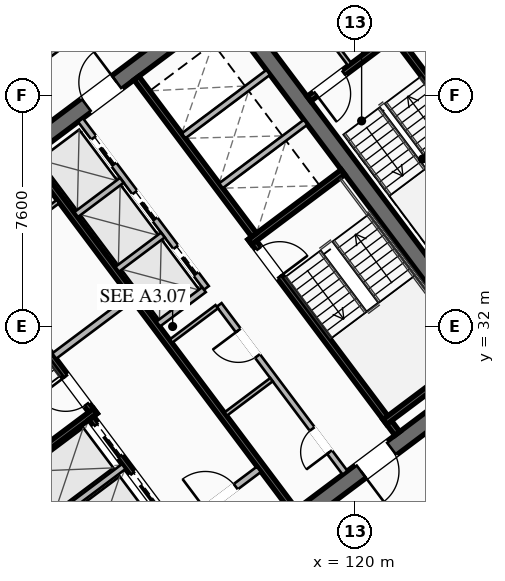
"""IFC4 building model, lengths in metres.
Left out: names, types, materials, properties, quantities, classifications, styles, units other than length and angle.
Written with IfcOpenShell. Run it as: python <this file> out.ifc"""

import sys

from ifc_helpers import new_model, si_unit, direction, frame, frame_2d, origin, place, context, subcontext, project, spatial, rectangle, extrude, element, fill, save


model = new_model("IFC4")
c1 = context("Model", 3, precision=1e-05, world=origin(), true_north=direction((0.0, 1.0)))
c2 = subcontext(c1, "Body", "Model", "MODEL_VIEW")
j1 = project(units=[si_unit("LENGTHUNIT", "METRE"), si_unit("PLANEANGLEUNIT", "RADIAN")], contexts=[c1])
p1 = place(None, origin())
s1 = spatial("IfcSite", under=j1, at=p1, CompositionType="ELEMENT")
p2 = place(p1, origin())
s2 = spatial("IfcBuilding", under=s1, at=p2, CompositionType="ELEMENT")
p3 = place(p2, frame((0.0, 0.0, 149.9)))
s3 = spatial("IfcBuildingStorey", under=s2, at=p3, CompositionType="ELEMENT", Elevation=149.9)
for number, where, z_axis, x_axis in (
    (1, (112.436, 21.077, 0.0), (0.0, 0.0, 1.0), (-0.6, 0.8, 0.0)),
    (2, (115.564, 42.923, 0.0), (0.0, 0.0, 1.0), (0.6, -0.8, 0.0)),
):
    element("IfcWall", number, at=place(p3, frame(where, z_axis=z_axis, x_axis=x_axis)), inside=s3, PredefinedType="SHEAR", context=c2, shape_type="SweptSolid", body=[
        extrude(rectangle(XDim=15.6, YDim=0.55, at=frame_2d((7.8, 0.0))), origin(), (0.0, 0.0, 1.0), 3.55),
    ])
p4 = place(p3, frame((124.539, 30.498, 0.0), z_axis=(0.0, 0.0, 1.0), x_axis=(-0.799998054672, -0.600002593761, 0.0)))
e3 = element("IfcWall", 3, at=p4, inside=s3, PredefinedType="SHEAR", context=c2, shape_type="SweptSolid", body=[
    extrude(rectangle(XDim=15.06, YDim=0.55, at=frame_2d((7.53, 0.0))), origin(), (0.0, 0.0, 1.0), 3.55),
])
p5 = place(p4, frame((9.23, 0.0, 0.0)))
e4 = element("IfcOpeningElement", 4, at=p5, cuts=e3, PredefinedType="OPENING", context=c2, shape_type="SweptSolid", body=[
    extrude(rectangle(XDim=1.25, YDim=2.25, at=frame_2d((0.625, 1.125))), frame((0.0, 0.285, 0.0), z_axis=(0.0, -1.0, 0.0), x_axis=(1.0, 0.0, 0.0)), (0.0, 0.0, 1.0), 0.57),
])
p6 = place(p4, frame((4.18, 0.0, 0.0)))
e5 = element("IfcOpeningElement", 5, at=p6, cuts=e3, PredefinedType="OPENING", context=c2, shape_type="SweptSolid", body=[
    extrude(rectangle(XDim=1.25, YDim=2.25, at=frame_2d((0.625, 1.125))), frame((0.0, 0.285, 0.0), z_axis=(0.0, -1.0, 0.0), x_axis=(1.0, 0.0, 0.0)), (0.0, 0.0, 1.0), 0.57),
])
p7 = place(p3, frame((103.461, 33.502, 0.0), z_axis=(0.0, 0.0, 1.0), x_axis=(0.799998054672, 0.600002593761, 0.0)))
e6 = element("IfcWall", 6, at=p7, inside=s3, PredefinedType="SHEAR", context=c2, shape_type="SweptSolid", body=[
    extrude(rectangle(XDim=15.06, YDim=0.55, at=frame_2d((7.53, 0.0))), origin(), (0.0, 0.0, 1.0), 3.55),
])
p8 = place(p7, frame((4.58, 0.0, 0.0)))
e7 = element("IfcOpeningElement", 7, at=p8, cuts=e6, PredefinedType="OPENING", context=c2, shape_type="SweptSolid", body=[
    extrude(rectangle(XDim=1.25, YDim=2.25, at=frame_2d((0.625, 1.125))), frame((0.0, 0.285, 0.0), z_axis=(0.0, -1.0, 0.0), x_axis=(1.0, 0.0, 0.0)), (0.0, 0.0, 1.0), 0.57),
])
p9 = place(p7, frame((9.63, 0.0, 0.0)))
e8 = element("IfcOpeningElement", 8, at=p9, cuts=e6, PredefinedType="OPENING", context=c2, shape_type="SweptSolid", body=[
    extrude(rectangle(XDim=1.25, YDim=2.25, at=frame_2d((0.625, 1.125))), frame((0.0, 0.285, 0.0), z_axis=(0.0, -1.0, 0.0), x_axis=(1.0, 0.0, 0.0)), (0.0, 0.0, 1.0), 0.57),
])
p10 = place(p3, frame((111.44, 29.08, 0.0), z_axis=(0.0, 0.0, 1.0), x_axis=(-0.59999029481, 0.8000072788, 0.0)))
e9 = element("IfcWall", 9, at=p10, inside=s3, PredefinedType="SHEAR", context=c2, shape_type="SweptSolid", body=[
    extrude(rectangle(XDim=8.05, YDim=0.2, at=frame_2d((4.025, 0.0))), origin(), (0.0, 0.0, 1.0), 3.37),
])
p11 = place(p10, frame((0.45, 0.0, 0.0)))
e10 = element("IfcOpeningElement", 10, at=p11, cuts=e9, PredefinedType="OPENING", context=c2, shape_type="SweptSolid", body=[
    extrude(rectangle(XDim=1.15, YDim=2.2, at=frame_2d((0.575, 1.1))), frame((0.0, 0.11, 0.0), z_axis=(0.0, -1.0, 0.0), x_axis=(1.0, 0.0, 0.0)), (0.0, 0.0, 1.0), 0.22),
])
p12 = place(p3, frame((108.396, 26.922, 0.0), z_axis=(0.0, 0.0, 1.0), x_axis=(0.800015298837, 0.599979601008, 0.0)))
e11 = element("IfcWall", 11, at=p12, inside=s3, PredefinedType="SHEAR", context=c2, shape_type="SweptSolid", body=[
    extrude(rectangle(XDim=3.83, YDim=0.2, at=frame_2d((1.915, 0.0))), origin(), (0.0, 0.0, 1.0), 3.37),
])
p13 = place(p3, frame((116.56, 34.92, 0.0), z_axis=(0.0, 0.0, 1.0), x_axis=(0.59999029481, -0.8000072788, 0.0)))
e12 = element("IfcWall", 12, at=p13, inside=s3, PredefinedType="SHEAR", context=c2, shape_type="SweptSolid", body=[
    extrude(rectangle(XDim=8.05, YDim=0.2, at=frame_2d((4.025, 0.0))), origin(), (0.0, 0.0, 1.0), 3.37),
])
p14 = place(p13, frame((0.45, 0.0, 0.0)))
e13 = element("IfcOpeningElement", 13, at=p14, cuts=e12, PredefinedType="OPENING", context=c2, shape_type="SweptSolid", body=[
    extrude(rectangle(XDim=1.15, YDim=2.2, at=frame_2d((0.575, 1.1))), frame((0.0, 0.11, 0.0), z_axis=(0.0, -1.0, 0.0), x_axis=(1.0, 0.0, 0.0)), (0.0, 0.0, 1.0), 0.22),
])
for number, where, z_axis, x_axis in (
    (14, (116.54, 34.78, 0.0), (0.0, 0.0, 1.0), (0.8, 0.6, 0.0)),
    (15, (120.98, 28.86, 0.0), (0.0, 0.0, 1.0), (0.8, 0.6, 0.0)),
):
    element("IfcWall", number, at=place(p3, frame(where, z_axis=z_axis, x_axis=x_axis)), inside=s3, PredefinedType="SHEAR", context=c2, shape_type="SweptSolid", body=[
        extrude(rectangle(XDim=3.83, YDim=0.2, at=frame_2d((1.915, 0.0))), origin(), (0.0, 0.0, 1.0), 3.37),
    ])
p15 = place(p3, frame((117.998, 25.936, 0.0), z_axis=(0.0, 0.0, 1.0), x_axis=(-0.600002693989, 0.799997979501, 0.0)))
e16 = element("IfcWall", 16, at=p15, inside=s3, PredefinedType="SHEAR", context=c2, shape_type="SweptSolid", body=[
    extrude(rectangle(XDim=14.5, YDim=0.2, at=frame_2d((7.25, 0.0))), origin(), (0.0, 0.0, 1.0), 3.37),
])
p16 = place(p3, frame((110.104, 31.028, 0.0), z_axis=(0.0, 0.0, 1.0), x_axis=(0.800018601094, 0.59997519774, 0.0)))
e17 = element("IfcWall", 17, at=p16, inside=s3, PredefinedType="SOLIDWALL", context=c2, shape_type="SweptSolid", body=[
    extrude(rectangle(XDim=3.15, YDim=0.22, at=frame_2d((1.575, 0.0))), origin(), (0.0, 0.0, 1.0), 2.723),
])
p17 = place(p3, frame((114.316, 25.412, 0.0), z_axis=(0.0, 0.0, 1.0), x_axis=(0.800018601094, 0.59997519774, 0.0)))
e18 = element("IfcWall", 18, at=p17, inside=s3, PredefinedType="SOLIDWALL", context=c2, shape_type="SweptSolid", body=[
    extrude(rectangle(XDim=3.15, YDim=0.22, at=frame_2d((1.575, 0.0))), origin(), (0.0, 0.0, 1.0), 2.723),
])
p18 = place(p17, frame((0.95, 0.0, 0.0)))
e19 = element("IfcOpeningElement", 19, at=p18, cuts=e18, PredefinedType="OPENING", context=c2, shape_type="SweptSolid", body=[
    extrude(rectangle(XDim=1.25, YDim=2.25, at=frame_2d((0.625, 1.125))), frame((0.0, 0.12, 0.0), z_axis=(0.0, -1.0, 0.0), x_axis=(1.0, 0.0, 0.0)), (0.0, 0.0, 1.0), 0.24),
])
p19 = place(p3, frame((115.19, 23.83, 0.0), z_axis=(0.0, 0.0, 1.0), x_axis=(-0.599993943644, 0.800004542231, 0.0)))
e20 = element("IfcWall", 20, at=p19, inside=s3, PredefinedType="SHEAR", context=c2, shape_type="SweptSolid", body=[
    extrude(rectangle(XDim=6.45, YDim=0.2, at=frame_2d((3.225, 0.0))), origin(), (0.0, 0.0, 1.0), 3.37),
])
p20 = place(p19, frame((4.875, 0.0, 0.0)))
e21 = element("IfcOpeningElement", 21, at=p20, cuts=e20, PredefinedType="OPENING", context=c2, shape_type="SweptSolid", body=[
    extrude(rectangle(XDim=1.3, YDim=2.25, at=frame_2d((0.65, 1.125))), frame((0.0, 0.11, 0.0), z_axis=(0.0, -1.0, 0.0), x_axis=(1.0, 0.0, 0.0)), (0.0, 0.0, 1.0), 0.22),
])
p21 = place(p19, frame((2.875, 0.0, 0.0)))
e22 = element("IfcOpeningElement", 22, at=p21, cuts=e20, PredefinedType="OPENING", context=c2, shape_type="SweptSolid", body=[
    extrude(rectangle(XDim=1.3, YDim=2.25, at=frame_2d((0.65, 1.125))), frame((0.0, 0.11, 0.0), z_axis=(0.0, -1.0, 0.0), x_axis=(1.0, 0.0, 0.0)), (0.0, 0.0, 1.0), 0.22),
])
p22 = place(p19, frame((0.675, 0.0, 0.0)))
e23 = element("IfcOpeningElement", 23, at=p22, cuts=e20, PredefinedType="OPENING", context=c2, shape_type="SweptSolid", body=[
    extrude(rectangle(XDim=1.3, YDim=2.25, at=frame_2d((0.65, 1.125))), frame((0.0, 0.11, 0.0), z_axis=(0.0, -1.0, 0.0), x_axis=(1.0, 0.0, 0.0)), (0.0, 0.0, 1.0), 0.22),
])
p23 = place(p3, frame((109.608, 25.306, 0.0), z_axis=(0.0, 0.0, 1.0), x_axis=(0.8, 0.6, 0.0)))
e24 = element("IfcWall", 24, at=p23, inside=s3, PredefinedType="SOLIDWALL", context=c2, shape_type="SweptSolid", body=[
    extrude(rectangle(XDim=3.48, YDim=0.2, at=frame_2d((1.74, 0.0))), origin(), (0.0, 0.0, 1.0), 3.37),
])
p24 = place(p3, frame((112.81, 40.17, 0.0), z_axis=(0.0, 0.0, 1.0), x_axis=(0.599993943644, -0.800004542231, 0.0)))
e25 = element("IfcWall", 25, at=p24, inside=s3, PredefinedType="SHEAR", context=c2, shape_type="SweptSolid", body=[
    extrude(rectangle(XDim=6.45, YDim=0.2, at=frame_2d((3.225, 0.0))), origin(), (0.0, 0.0, 1.0), 3.37),
])
for number, where, z_axis, x_axis in (
    (26, (115.59, 36.63, 0.0), (0.0, 0.0, 1.0), (0.8, 0.6, 0.0)),
    (27, (114.36, 38.27, 0.0), (0.0, 0.0, 1.0), (0.8, 0.6, 0.0)),
):
    element("IfcWall", number, at=place(p3, frame(where, z_axis=z_axis, x_axis=x_axis)), inside=s3, PredefinedType="SOLIDWALL", context=c2, shape_type="SweptSolid", body=[
        extrude(rectangle(XDim=3.48, YDim=0.2, at=frame_2d((1.74, 0.0))), origin(), (0.0, 0.0, 1.0), 3.37),
    ])
p25 = place(p3, frame((107.71, 34.22, 0.0), z_axis=(0.0, 0.0, 1.0), x_axis=(0.799981399002, 0.60002480053, 0.0)))
e28 = element("IfcWall", 28, at=p25, inside=s3, PredefinedType="PARTITIONING", context=c2, shape_type="SweptSolid", body=[
    extrude(rectangle(XDim=3.15, YDim=0.135, at=frame_2d((1.575, 0.0))), origin(), (0.0, 0.0, 1.0), 2.723),
])
p26 = place(p25, frame((1.05, 0.0, 0.0)))
e29 = element("IfcOpeningElement", 29, at=p26, cuts=e28, PredefinedType="OPENING", context=c2, shape_type="SweptSolid", body=[
    extrude(rectangle(XDim=1.05, YDim=2.2, at=frame_2d((0.525, 1.1))), frame((0.0, 0.077, 0.0), z_axis=(0.0, -1.0, 0.0), x_axis=(1.0, 0.0, 0.0)), (0.0, 0.0, 1.0), 0.155),
])
p27 = place(p3, frame((119.67, 27.19, 0.0), z_axis=(0.0, 0.0, 1.0), x_axis=(-0.599988677396, 0.800008491828, 0.0)))
e30 = element("IfcWall", 30, at=p27, inside=s3, PredefinedType="SOLIDWALL", context=c2, shape_type="SweptSolid", body=[
    extrude(rectangle(XDim=6.9, YDim=0.2, at=frame_2d((3.45, 0.0))), origin(), (0.0, 0.0, 1.0), 2.723),
])
p28 = place(p27, frame((0.85, 0.0, 0.0)))
e31 = element("IfcOpeningElement", 31, at=p28, cuts=e30, PredefinedType="OPENING", context=c2, shape_type="SweptSolid", body=[
    extrude(rectangle(XDim=0.95, YDim=2.05, at=frame_2d((0.475, 1.025))), frame((0.0, 0.11, 0.0), z_axis=(0.0, -1.0, 0.0), x_axis=(1.0, 0.0, 0.0)), (0.0, 0.0, 1.0), 0.22),
])
p29 = place(p27, frame((4.8, 0.0, 0.0)))
e32 = element("IfcOpeningElement", 32, at=p29, cuts=e30, PredefinedType="OPENING", context=c2, shape_type="SweptSolid", body=[
    extrude(rectangle(XDim=1.05, YDim=2.2, at=frame_2d((0.525, 1.1))), frame((0.0, 0.11, 0.0), z_axis=(0.0, -1.0, 0.0), x_axis=(1.0, 0.0, 0.0)), (0.0, 0.0, 1.0), 0.22),
])
for number, where, z_axis, x_axis in (
    (33, (113.946, 31.522, 0.0), (0.0, 0.0, 1.0), (0.8, 0.6, 0.0)),
    (34, (115.746, 29.122, 0.0), (0.0, 0.0, 1.0), (0.8, 0.6, 0.0)),
):
    element("IfcWall", number, at=place(p3, frame(where, z_axis=z_axis, x_axis=x_axis)), inside=s3, PredefinedType="PARTITIONING", context=c2, shape_type="SweptSolid", body=[
        extrude(rectangle(XDim=1.88, YDim=0.135, at=frame_2d((0.94, 0.0))), origin(), (0.0, 0.0, 1.0), 2.723),
    ])
p30 = place(p3, frame((115.11, 33.27, 0.0), z_axis=(0.0, 0.0, 1.0), x_axis=(-0.600011322243, 0.799991508192, 0.0)))
e35 = element("IfcWall", 35, at=p30, inside=s3, PredefinedType="SOLIDWALL", context=c2, shape_type="SweptSolid", body=[
    extrude(rectangle(XDim=6.9, YDim=0.2, at=frame_2d((3.45, 0.0))), origin(), (0.0, 0.0, 1.0), 3.37),
])
p31 = place(p30, frame((0.575, 0.0, 0.0)))
e36 = element("IfcOpeningElement", 36, at=p31, cuts=e35, PredefinedType="OPENING", context=c2, shape_type="SweptSolid", body=[
    extrude(rectangle(XDim=1.1, YDim=2.2, at=frame_2d((0.55, 1.1))), frame((0.0, 0.11, 0.0), z_axis=(0.0, -1.0, 0.0), x_axis=(1.0, 0.0, 0.0)), (0.0, 0.0, 1.0), 0.22),
])
p32 = place(p30, frame((2.825, 0.0, 0.0)))
e37 = element("IfcOpeningElement", 37, at=p32, cuts=e35, PredefinedType="OPENING", context=c2, shape_type="SweptSolid", body=[
    extrude(rectangle(XDim=1.1, YDim=2.2, at=frame_2d((0.55, 1.1))), frame((0.0, 0.11, 0.0), z_axis=(0.0, -1.0, 0.0), x_axis=(1.0, 0.0, 0.0)), (0.0, 0.0, 1.0), 0.22),
])
p33 = place(p30, frame((5.075, 0.0, 0.0)))
e38 = element("IfcOpeningElement", 38, at=p33, cuts=e35, PredefinedType="OPENING", context=c2, shape_type="SweptSolid", body=[
    extrude(rectangle(XDim=1.1, YDim=2.2, at=frame_2d((0.55, 1.1))), frame((0.0, 0.11, 0.0), z_axis=(0.0, -1.0, 0.0), x_axis=(1.0, 0.0, 0.0)), (0.0, 0.0, 1.0), 0.22),
])
p34 = place(p3, frame((113.526, 32.082, 0.0), z_axis=(0.0, 0.0, 1.0), x_axis=(0.800046745961, 0.599937666993, 0.0)))
e39 = element("IfcWall", 39, at=p34, inside=s3, PredefinedType="SOLIDWALL", context=c2, shape_type="SweptSolid", body=[
    extrude(rectangle(XDim=1.88, YDim=0.2, at=frame_2d((0.94, 0.0))), origin(), (0.0, 0.0, 1.0), 3.37),
])
p35 = place(p3, frame((112.176, 33.882, 0.0), z_axis=(0.0, 0.0, 1.0), x_axis=(0.8, 0.6, 0.0)))
e40 = element("IfcWall", 40, at=p35, inside=s3, PredefinedType="SOLIDWALL", context=c2, shape_type="SweptSolid", body=[
    extrude(rectangle(XDim=1.88, YDim=0.2, at=frame_2d((0.94, 0.0))), origin(), (0.0, 0.0, 1.0), 3.37),
])
p36 = place(p3, frame((110.826, 35.682, 0.0), z_axis=(0.0, 0.0, 1.0), x_axis=(0.799984418148, 0.600020775241, 0.0)))
e41 = element("IfcWall", 41, at=p36, inside=s3, PredefinedType="SOLIDWALL", context=c2, shape_type="SweptSolid", body=[
    extrude(rectangle(XDim=1.88, YDim=0.2, at=frame_2d((0.94, 0.0))), origin(), (0.0, 0.0, 1.0), 3.37),
])
p37 = place(p3, frame((125.304, 36.228, 0.0), z_axis=(0.0, 0.0, 1.0), x_axis=(-0.59998851072, 0.800008616831, 0.0)))
e42 = element("IfcWall", 42, at=p37, inside=s3, PredefinedType="SHEAR", context=c2, shape_type="SweptSolid", body=[
    extrude(rectangle(XDim=6.8, YDim=0.2, at=frame_2d((3.4, 0.0))), origin(), (0.0, 0.0, 1.0), 3.37),
])
p38 = place(p3, frame((121.204, 41.528, 0.0), z_axis=(0.0, 0.0, 1.0), x_axis=(-0.800017232136, -0.599977023131, 0.0)))
e43 = element("IfcWall", 43, at=p38, inside=s3, PredefinedType="SHEAR", context=c2, shape_type="SweptSolid", body=[
    extrude(rectangle(XDim=3.4, YDim=0.2, at=frame_2d((1.7, 0.0))), origin(), (0.0, 0.0, 1.0), 3.37),
])
p39 = place(p38, frame((1.975, 0.0, 0.0)))
e44 = element("IfcOpeningElement", 44, at=p39, cuts=e43, PredefinedType="OPENING", context=c2, shape_type="SweptSolid", body=[
    extrude(rectangle(XDim=1.15, YDim=2.2, at=frame_2d((0.575, 1.1))), frame((0.0, 0.11, 0.0), z_axis=(0.0, -1.0, 0.0), x_axis=(1.0, 0.0, 0.0)), (0.0, 0.0, 1.0), 0.22),
])
p40 = place(p3, frame((119.824, 40.618, 0.0), z_axis=(0.0, 0.0, 1.0), x_axis=(-0.599982243973, 0.800013316712, 0.0)))
e45 = element("IfcWall", 45, at=p40, inside=s3, PredefinedType="PARTITIONING", context=c2, shape_type="SweptSolid", body=[
    extrude(rectangle(XDim=4.4, YDim=0.135, at=frame_2d((2.2, 0.0))), origin(), (0.0, 0.0, 1.0), 2.723),
])
p41 = place(p3, frame((95.738, 30.266, 0.0), z_axis=(0.0, 0.0, 1.0), x_axis=(0.800003744006, 0.59999500796, 0.0)))
e46 = element("IfcWall", 46, at=p41, inside=s3, PredefinedType="PARTITIONING", context=c2, shape_type="SweptSolid", body=[
    extrude(rectangle(XDim=31.3, YDim=0.135, at=frame_2d((15.65, 0.0))), origin(), (0.0, 0.0, 1.0), 2.723),
])
p42 = place(p41, frame((0.3, 0.0, 0.0)))
e47 = element("IfcOpeningElement", 47, at=p42, cuts=e46, PredefinedType="OPENING", context=c2, shape_type="SweptSolid", body=[
    extrude(rectangle(XDim=0.95, YDim=2.05, at=frame_2d((0.475, 1.025))), frame((0.0, 0.077, 0.0), z_axis=(0.0, -1.0, 0.0), x_axis=(1.0, 0.0, 0.0)), (0.0, 0.0, 1.0), 0.155),
])
p43 = place(p41, frame((15.493, 0.0, 0.0)))
e48 = element("IfcOpeningElement", 48, at=p43, cuts=e46, PredefinedType="OPENING", context=c2, shape_type="SweptSolid", body=[
    extrude(rectangle(XDim=0.95, YDim=2.05, at=frame_2d((0.475, 1.025))), frame((0.0, 0.077, 0.0), z_axis=(0.0, -1.0, 0.0), x_axis=(1.0, 0.0, 0.0)), (0.0, 0.0, 1.0), 0.155),
])
p44 = place(p41, frame((30.05, 0.0, 0.0)))
e49 = element("IfcOpeningElement", 49, at=p44, cuts=e46, PredefinedType="OPENING", context=c2, shape_type="SweptSolid", body=[
    extrude(rectangle(XDim=0.95, YDim=2.05, at=frame_2d((0.475, 1.025))), frame((0.0, 0.077, 0.0), z_axis=(0.0, -1.0, 0.0), x_axis=(1.0, 0.0, 0.0)), (0.0, 0.0, 1.0), 0.155),
])
p45 = place(p3, frame((133.09, 32.63, 0.0), z_axis=(0.0, 0.0, 1.0), x_axis=(-0.800003744006, -0.59999500796, 0.0)))
e50 = element("IfcWall", 50, at=p45, inside=s3, PredefinedType="PARTITIONING", context=c2, shape_type="SweptSolid", body=[
    extrude(rectangle(XDim=31.3, YDim=0.135, at=frame_2d((15.65, 0.0))), origin(), (0.0, 0.0, 1.0), 2.723),
])
p46 = place(p45, frame((29.97, 0.0, 0.0)))
e51 = element("IfcOpeningElement", 51, at=p46, cuts=e50, PredefinedType="OPENING", context=c2, shape_type="SweptSolid", body=[
    extrude(rectangle(XDim=0.95, YDim=2.05, at=frame_2d((0.475, 1.025))), frame((0.0, 0.077, 0.0), z_axis=(0.0, -1.0, 0.0), x_axis=(1.0, 0.0, 0.0)), (0.0, 0.0, 1.0), 0.155),
])
p47 = place(p45, frame((18.914, 0.0, 0.0)))
e52 = element("IfcOpeningElement", 52, at=p47, cuts=e50, PredefinedType="OPENING", context=c2, shape_type="SweptSolid", body=[
    extrude(rectangle(XDim=0.95, YDim=2.05, at=frame_2d((0.475, 1.025))), frame((0.0, 0.077, 0.0), z_axis=(0.0, -1.0, 0.0), x_axis=(1.0, 0.0, 0.0)), (0.0, 0.0, 1.0), 0.155),
])
p48 = place(p45, frame((0.38, 0.0, 0.0)))
e53 = element("IfcOpeningElement", 53, at=p48, cuts=e50, PredefinedType="OPENING", context=c2, shape_type="SweptSolid", body=[
    extrude(rectangle(XDim=0.95, YDim=2.05, at=frame_2d((0.475, 1.025))), frame((0.0, 0.077, 0.0), z_axis=(0.0, -1.0, 0.0), x_axis=(1.0, 0.0, 0.0)), (0.0, 0.0, 1.0), 0.155),
])
p49 = place(p3, frame((112.104, 20.928, 0.0), z_axis=(0.0, 0.0, 1.0), x_axis=(-0.599994940075, 0.800003794918, 0.0)))
e54 = element("IfcWall", 54, at=p49, inside=s3, PredefinedType="PARTITIONING", context=c2, shape_type="SweptSolid", body=[
    extrude(rectangle(XDim=15.44, YDim=0.135, at=frame_2d((7.72, 0.0))), origin(), (0.0, 0.0, 1.0), 2.723),
])
p50 = place(p9, origin())
e55 = element("IfcDoor", 55, at=p50, inside=s3, OperationType="SINGLE_SWING_RIGHT", PredefinedType="DOOR", context=c2, shape_type="SweptSolid", body=[
    extrude(rectangle(XDim=1.25, YDim=2.25, at=frame_2d((0.625, 1.125))), frame((0.0, 0.025, 0.0), z_axis=(0.0, -1.0, 0.0), x_axis=(1.0, 0.0, 0.0)), (0.0, 0.0, 1.0), 0.05),
])
fill(e8, e55)
p51 = place(p6, origin())
e56 = element("IfcDoor", 56, at=p51, inside=s3, OperationType="SINGLE_SWING_RIGHT", PredefinedType="DOOR", context=c2, shape_type="SweptSolid", body=[
    extrude(rectangle(XDim=1.25, YDim=2.25, at=frame_2d((0.625, 1.125))), frame((0.0, 0.025, 0.0), z_axis=(0.0, -1.0, 0.0), x_axis=(1.0, 0.0, 0.0)), (0.0, 0.0, 1.0), 0.05),
])
fill(e5, e56)
p52 = place(p11, origin())
e57 = element("IfcDoor", 57, at=p52, inside=s3, OperationType="SINGLE_SWING_RIGHT", PredefinedType="DOOR", context=c2, shape_type="SweptSolid", body=[
    extrude(rectangle(XDim=1.15, YDim=2.2, at=frame_2d((0.575, 1.1))), frame((0.0, 0.025, 0.0), z_axis=(0.0, -1.0, 0.0), x_axis=(1.0, 0.0, 0.0)), (0.0, 0.0, 1.0), 0.05),
])
fill(e10, e57)
p53 = place(p14, origin())
e58 = element("IfcDoor", 58, at=p53, inside=s3, OperationType="SINGLE_SWING_RIGHT", PredefinedType="DOOR", context=c2, shape_type="SweptSolid", body=[
    extrude(rectangle(XDim=1.15, YDim=2.2, at=frame_2d((0.575, 1.1))), frame((0.0, 0.025, 0.0), z_axis=(0.0, -1.0, 0.0), x_axis=(1.0, 0.0, 0.0)), (0.0, 0.0, 1.0), 0.05),
])
fill(e13, e58)
p54 = place(p18, origin())
e59 = element("IfcDoor", 59, at=p54, inside=s3, OperationType="SINGLE_SWING_LEFT", PredefinedType="DOOR", context=c2, shape_type="SweptSolid", body=[
    extrude(rectangle(XDim=1.25, YDim=2.25, at=frame_2d((0.625, 1.125))), frame((0.0, 0.025, 0.0), z_axis=(0.0, -1.0, 0.0), x_axis=(1.0, 0.0, 0.0)), (0.0, 0.0, 1.0), 0.05),
])
fill(e19, e59)
p55 = place(p28, origin())
e60 = element("IfcDoor", 60, at=p55, inside=s3, OperationType="SINGLE_SWING_LEFT", PredefinedType="DOOR", context=c2, shape_type="SweptSolid", body=[
    extrude(rectangle(XDim=0.95, YDim=2.05, at=frame_2d((0.475, 1.025))), frame((0.0, 0.025, 0.0), z_axis=(0.0, -1.0, 0.0), x_axis=(1.0, 0.0, 0.0)), (0.0, 0.0, 1.0), 0.05),
])
fill(e31, e60)
p56 = place(p29, origin())
e61 = element("IfcDoor", 61, at=p56, inside=s3, OperationType="SINGLE_SWING_RIGHT", PredefinedType="DOOR", context=c2, shape_type="SweptSolid", body=[
    extrude(rectangle(XDim=1.05, YDim=2.2, at=frame_2d((0.525, 1.1))), frame((0.0, 0.025, 0.0), z_axis=(0.0, -1.0, 0.0), x_axis=(1.0, 0.0, 0.0)), (0.0, 0.0, 1.0), 0.05),
])
fill(e32, e61)
p57 = place(p39, origin())
e62 = element("IfcDoor", 62, at=p57, inside=s3, OperationType="SINGLE_SWING_RIGHT", PredefinedType="DOOR", context=c2, shape_type="SweptSolid", body=[
    extrude(rectangle(XDim=1.15, YDim=2.2, at=frame_2d((0.575, 1.1))), frame((0.0, 0.025, 0.0), z_axis=(0.0, -1.0, 0.0), x_axis=(1.0, 0.0, 0.0)), (0.0, 0.0, 1.0), 0.05),
])
fill(e44, e62)
p58 = place(p20, origin())
e63 = element("IfcDoor", 63, at=p58, inside=s3, OperationType="SLIDING_TO_LEFT", PredefinedType="DOOR", context=c2, shape_type="SweptSolid", body=[
    extrude(rectangle(XDim=1.3, YDim=2.25, at=frame_2d((0.65, 1.125))), frame((0.0, 0.025, 0.0), z_axis=(0.0, -1.0, 0.0), x_axis=(1.0, 0.0, 0.0)), (0.0, 0.0, 1.0), 0.05),
])
fill(e21, e63)
p59 = place(p21, origin())
e64 = element("IfcDoor", 64, at=p59, inside=s3, OperationType="SLIDING_TO_LEFT", PredefinedType="DOOR", context=c2, shape_type="SweptSolid", body=[
    extrude(rectangle(XDim=1.3, YDim=2.25, at=frame_2d((0.65, 1.125))), frame((0.0, 0.025, 0.0), z_axis=(0.0, -1.0, 0.0), x_axis=(1.0, 0.0, 0.0)), (0.0, 0.0, 1.0), 0.05),
])
fill(e22, e64)
p60 = place(p31, origin())
e65 = element("IfcDoor", 65, at=p60, inside=s3, OperationType="SLIDING_TO_LEFT", PredefinedType="DOOR", context=c2, shape_type="SweptSolid", body=[
    extrude(rectangle(XDim=1.1, YDim=2.2, at=frame_2d((0.55, 1.1))), frame((0.0, 0.025, 0.0), z_axis=(0.0, -1.0, 0.0), x_axis=(1.0, 0.0, 0.0)), (0.0, 0.0, 1.0), 0.05),
])
fill(e36, e65)
p61 = place(p32, origin())
e66 = element("IfcDoor", 66, at=p61, inside=s3, OperationType="SLIDING_TO_LEFT", PredefinedType="DOOR", context=c2, shape_type="SweptSolid", body=[
    extrude(rectangle(XDim=1.1, YDim=2.2, at=frame_2d((0.55, 1.1))), frame((0.0, 0.025, 0.0), z_axis=(0.0, -1.0, 0.0), x_axis=(1.0, 0.0, 0.0)), (0.0, 0.0, 1.0), 0.05),
])
fill(e37, e66)
p62 = place(p33, origin())
e67 = element("IfcDoor", 67, at=p62, inside=s3, OperationType="SLIDING_TO_LEFT", PredefinedType="DOOR", context=c2, shape_type="SweptSolid", body=[
    extrude(rectangle(XDim=1.1, YDim=2.2, at=frame_2d((0.55, 1.1))), frame((0.0, 0.025, 0.0), z_axis=(0.0, -1.0, 0.0), x_axis=(1.0, 0.0, 0.0)), (0.0, 0.0, 1.0), 0.05),
])
fill(e38, e67)
save(model, sys.argv[1])
